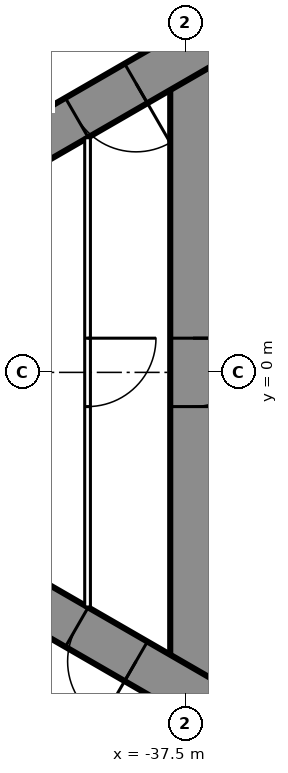
"""IFC4 building model, lengths in metres.
Left out: names, types, materials, properties, quantities, classifications, styles, units other than length and angle.
Written with IfcOpenShell. Run it as: python <this file> out.ifc"""

import sys

from ifc_helpers import new_model, si_unit, direction, frame, frame_2d, origin, place, context, subcontext, project, spatial, rectangle, extrude, element, fill, save


model = new_model("IFC4")
c1 = context("Model", 3, precision=1e-05, world=origin(), true_north=direction((0.0, 1.0)))
c2 = subcontext(c1, "Body", "Model", "MODEL_VIEW")
j1 = project(units=[si_unit("LENGTHUNIT", "METRE"), si_unit("PLANEANGLEUNIT", "RADIAN")], contexts=[c1])
p1 = place(None, origin())
s1 = spatial("IfcSite", under=j1, at=p1, CompositionType="ELEMENT")
p2 = place(p1, origin())
s2 = spatial("IfcBuilding", under=s1, at=p2, CompositionType="ELEMENT")
p3 = place(p2, frame((0.0, 0.0, 240.5)))
s3 = spatial("IfcBuildingStorey", under=s2, at=p3, CompositionType="ELEMENT", Elevation=240.5)
p4 = place(p3, frame((-37.3, 8.6, 0.0), z_axis=(0.0, 0.0, 1.0), x_axis=(0.0, -1.0, 0.0)))
e1 = element("IfcWall", 1, at=p4, inside=s3, PredefinedType="SHEAR", context=c2, shape_type="SweptSolid", body=[
    extrude(rectangle(XDim=17.2, YDim=1.2, at=frame_2d((8.6, 0.0))), origin(), (0.0, 0.0, 1.0), 3.6),
])
p5 = place(p4, frame((7.7, 0.0, 0.0)))
e2 = element("IfcOpeningElement", 2, at=p5, cuts=e1, PredefinedType="OPENING", context=c2, shape_type="SweptSolid", body=[
    extrude(rectangle(XDim=1.8, YDim=2.2, at=frame_2d((0.9, 1.1))), frame((0.0, 0.61, 0.0), z_axis=(0.0, -1.0, 0.0), x_axis=(1.0, 0.0, 0.0)), (0.0, 0.0, 1.0), 1.22),
])
p6 = place(p3, frame((-27.2, 14.3, 0.0), z_axis=(0.0, 0.0, 1.0), x_axis=(-0.866026593062, -0.499997940104, 0.0)))
e3 = element("IfcWall", 3, at=p6, inside=s3, PredefinedType="SHEAR", context=c2, shape_type="SweptSolid", body=[
    extrude(rectangle(XDim=28.946, YDim=1.2, at=frame_2d((14.473, 0.0))), origin(), (0.0, 0.0, 1.0), 3.6),
])
p7 = place(p6, frame((4.6, 0.0, 0.0)))
e4 = element("IfcOpeningElement", 4, at=p7, cuts=e3, PredefinedType="OPENING", context=c2, shape_type="SweptSolid", body=[
    extrude(rectangle(XDim=1.0, YDim=2.2, at=frame_2d((0.5, 1.1))), frame((0.0, 0.61, 0.0), z_axis=(0.0, -1.0, 0.0), x_axis=(1.0, 0.0, 0.0)), (0.0, 0.0, 1.0), 1.22),
])
p8 = place(p6, frame((13.395, 0.0, 0.0)))
e5 = element("IfcOpeningElement", 5, at=p8, cuts=e3, PredefinedType="OPENING", context=c2, shape_type="SweptSolid", body=[
    extrude(rectangle(XDim=1.8, YDim=2.2, at=frame_2d((0.9, 1.1))), frame((0.0, 0.61, 0.0), z_axis=(0.0, -1.0, 0.0), x_axis=(1.0, 0.0, 0.0)), (0.0, 0.0, 1.0), 1.22),
])
p9 = place(p3, frame((-27.2, -14.3, 0.0), z_axis=(0.0, 0.0, 1.0), x_axis=(-0.866024021859, 0.500002393557, 0.0)))
e6 = element("IfcWall", 6, at=p9, inside=s3, PredefinedType="SHEAR", context=c2, shape_type="SweptSolid", body=[
    extrude(rectangle(XDim=27.907, YDim=1.2, at=frame_2d((13.954, 0.0))), origin(), (0.0, 0.0, 1.0), 3.6),
])
p10 = place(p9, frame((4.6, 0.0, 0.0)))
e7 = element("IfcOpeningElement", 7, at=p10, cuts=e6, PredefinedType="OPENING", context=c2, shape_type="SweptSolid", body=[
    extrude(rectangle(XDim=1.0, YDim=2.2, at=frame_2d((0.5, 1.1))), frame((0.0, 0.61, 0.0), z_axis=(0.0, -1.0, 0.0), x_axis=(1.0, 0.0, 0.0)), (0.0, 0.0, 1.0), 1.22),
])
p11 = place(p9, frame((13.395, 0.0, 0.0)))
e8 = element("IfcOpeningElement", 8, at=p11, cuts=e6, PredefinedType="OPENING", context=c2, shape_type="SweptSolid", body=[
    extrude(rectangle(XDim=1.8, YDim=2.2, at=frame_2d((0.9, 1.1))), frame((0.0, 0.61, 0.0), z_axis=(0.0, -1.0, 0.0), x_axis=(1.0, 0.0, 0.0)), (0.0, 0.0, 1.0), 1.22),
])
p12 = place(p3, frame((-28.737, 16.068, 0.0), z_axis=(0.0, 0.0, 1.0), x_axis=(-0.866026057212, -0.499998868229, 0.0)))
e9 = element("IfcWall", 9, at=p12, inside=s3, PredefinedType="PARTITIONING", context=c2, shape_type="SweptSolid", body=[
    extrude(rectangle(XDim=32.137, YDim=0.2, at=frame_2d((16.068, 0.0))), origin(), (0.0, 0.0, 1.0), 3.35),
])
p13 = place(p12, frame((1.08, 0.0, 0.0)))
e10 = element("IfcOpeningElement", 10, at=p13, cuts=e9, PredefinedType="OPENING", context=c2, shape_type="SweptSolid", body=[
    extrude(rectangle(XDim=1.8, YDim=2.03, at=frame_2d((0.9, 1.015))), frame((0.0, 0.11, 0.0), z_axis=(0.0, -1.0, 0.0), x_axis=(1.0, 0.0, 0.0)), (0.0, 0.0, 1.0), 0.22),
])
p14 = place(p12, frame((6.86, 0.0, 0.0)))
e11 = element("IfcOpeningElement", 11, at=p14, cuts=e9, PredefinedType="OPENING", context=c2, shape_type="SweptSolid", body=[
    extrude(rectangle(XDim=1.0, YDim=2.2, at=frame_2d((0.5, 1.1))), frame((0.0, 0.11, 0.0), z_axis=(0.0, -1.0, 0.0), x_axis=(1.0, 0.0, 0.0)), (0.0, 0.0, 1.0), 0.22),
])
p15 = place(p12, frame((16.418, 0.0, 0.0)))
e12 = element("IfcOpeningElement", 12, at=p15, cuts=e9, PredefinedType="OPENING", context=c2, shape_type="SweptSolid", body=[
    extrude(rectangle(XDim=0.95, YDim=2.2, at=frame_2d((0.475, 1.1))), frame((0.0, 0.11, 0.0), z_axis=(0.0, -1.0, 0.0), x_axis=(1.0, 0.0, 0.0)), (0.0, 0.0, 1.0), 0.22),
])
p16 = place(p12, frame((20.567, 0.0, 0.0)))
e13 = element("IfcOpeningElement", 13, at=p16, cuts=e9, PredefinedType="OPENING", context=c2, shape_type="SweptSolid", body=[
    extrude(rectangle(XDim=0.95, YDim=2.2, at=frame_2d((0.475, 1.1))), frame((0.0, 0.11, 0.0), z_axis=(0.0, -1.0, 0.0), x_axis=(1.0, 0.0, 0.0)), (0.0, 0.0, 1.0), 0.22),
])
p17 = place(p12, frame((27.065, 0.0, 0.0)))
e14 = element("IfcOpeningElement", 14, at=p17, cuts=e9, PredefinedType="OPENING", context=c2, shape_type="SweptSolid", body=[
    extrude(rectangle(XDim=0.95, YDim=2.2, at=frame_2d((0.475, 1.1))), frame((0.0, 0.11, 0.0), z_axis=(0.0, -1.0, 0.0), x_axis=(1.0, 0.0, 0.0)), (0.0, 0.0, 1.0), 0.22),
])
p18 = place(p3, frame((-40.075, 6.174, 0.0), z_axis=(0.0, 0.0, 1.0), x_axis=(0.0, -1.0, 0.0)))
e15 = element("IfcWall", 15, at=p18, inside=s3, PredefinedType="PARTITIONING", context=c2, shape_type="SweptSolid", body=[
    extrude(rectangle(XDim=12.348, YDim=0.15, at=frame_2d((6.174, 0.0))), origin(), (0.0, 0.0, 1.0), 3.35),
])
p19 = place(p18, frame((5.274, 0.0, 0.0)))
e16 = element("IfcOpeningElement", 16, at=p19, cuts=e15, PredefinedType="OPENING", context=c2, shape_type="SweptSolid", body=[
    extrude(rectangle(XDim=1.8, YDim=2.2, at=frame_2d((0.9, 1.1))), frame((0.0, 0.085, 0.0), z_axis=(0.0, -1.0, 0.0), x_axis=(1.0, 0.0, 0.0)), (0.0, 0.0, 1.0), 0.17),
])
p20 = place(p3, frame((-39.758, -11.697, 0.0), z_axis=(0.0, 0.0, 1.0), x_axis=(-0.866024194504, 0.500002094529, 0.0)))
e17 = element("IfcWall", 17, at=p20, inside=s3, PredefinedType="PARTITIONING", context=c2, shape_type="SweptSolid", body=[
    extrude(rectangle(XDim=6.6, YDim=0.25, at=frame_2d((3.3, 0.0))), origin(), (0.0, 0.0, 1.0), 3.35),
])
p21 = place(p20, frame((0.75, 0.0, 0.0)))
e18 = element("IfcOpeningElement", 18, at=p21, cuts=e17, PredefinedType="OPENING", context=c2, shape_type="SweptSolid", body=[
    extrude(rectangle(XDim=1.1, YDim=2.2, at=frame_2d((0.55, 1.1))), frame((0.0, 0.135, 0.0), z_axis=(0.0, -1.0, 0.0), x_axis=(1.0, 0.0, 0.0)), (0.0, 0.0, 1.0), 0.27),
])
p22 = place(p20, frame((2.75, 0.0, 0.0)))
e19 = element("IfcOpeningElement", 19, at=p22, cuts=e17, PredefinedType="OPENING", context=c2, shape_type="SweptSolid", body=[
    extrude(rectangle(XDim=1.1, YDim=2.2, at=frame_2d((0.55, 1.1))), frame((0.0, 0.135, 0.0), z_axis=(0.0, -1.0, 0.0), x_axis=(1.0, 0.0, 0.0)), (0.0, 0.0, 1.0), 0.27),
])
p23 = place(p20, frame((4.75, 0.0, 0.0)))
e20 = element("IfcOpeningElement", 20, at=p23, cuts=e17, PredefinedType="OPENING", context=c2, shape_type="SweptSolid", body=[
    extrude(rectangle(XDim=1.1, YDim=2.2, at=frame_2d((0.55, 1.1))), frame((0.0, 0.135, 0.0), z_axis=(0.0, -1.0, 0.0), x_axis=(1.0, 0.0, 0.0)), (0.0, 0.0, 1.0), 0.27),
])
p24 = place(p19, origin())
e21 = element("IfcDoor", 21, at=p24, inside=s3, OperationType="DOUBLE_DOOR_SINGLE_SWING", PredefinedType="DOOR", context=c2, shape_type="SweptSolid", body=[
    extrude(rectangle(XDim=1.8, YDim=2.2, at=frame_2d((0.9, 1.1))), frame((0.0, 0.025, 0.0), z_axis=(0.0, -1.0, 0.0), x_axis=(1.0, 0.0, 0.0)), (0.0, 0.0, 1.0), 0.05),
])
fill(e16, e21)
p25 = place(p8, origin())
e22 = element("IfcDoor", 22, at=p25, inside=s3, OperationType="DOUBLE_DOOR_SINGLE_SWING", PredefinedType="DOOR", context=c2, shape_type="SweptSolid", body=[
    extrude(rectangle(XDim=1.8, YDim=2.2, at=frame_2d((0.9, 1.1))), frame((0.0, 0.025, 0.0), z_axis=(0.0, -1.0, 0.0), x_axis=(1.0, 0.0, 0.0)), (0.0, 0.0, 1.0), 0.05),
])
fill(e5, e22)
p26 = place(p11, origin())
e23 = element("IfcDoor", 23, at=p26, inside=s3, OperationType="DOUBLE_DOOR_SINGLE_SWING", PredefinedType="DOOR", context=c2, shape_type="SweptSolid", body=[
    extrude(rectangle(XDim=1.8, YDim=2.2, at=frame_2d((0.9, 1.1))), frame((0.0, 0.025, 0.0), z_axis=(0.0, -1.0, 0.0), x_axis=(1.0, 0.0, 0.0)), (0.0, 0.0, 1.0), 0.05),
])
fill(e8, e23)
p27 = place(p5, origin())
e24 = element("IfcDoor", 24, at=p27, inside=s3, OperationType="DOUBLE_DOOR_SINGLE_SWING", PredefinedType="DOOR", context=c2, shape_type="SweptSolid", body=[
    extrude(rectangle(XDim=1.8, YDim=2.2, at=frame_2d((0.9, 1.1))), frame((0.0, 0.025, 0.0), z_axis=(0.0, -1.0, 0.0), x_axis=(1.0, 0.0, 0.0)), (0.0, 0.0, 1.0), 0.05),
])
fill(e2, e24)
save(model, sys.argv[1])
